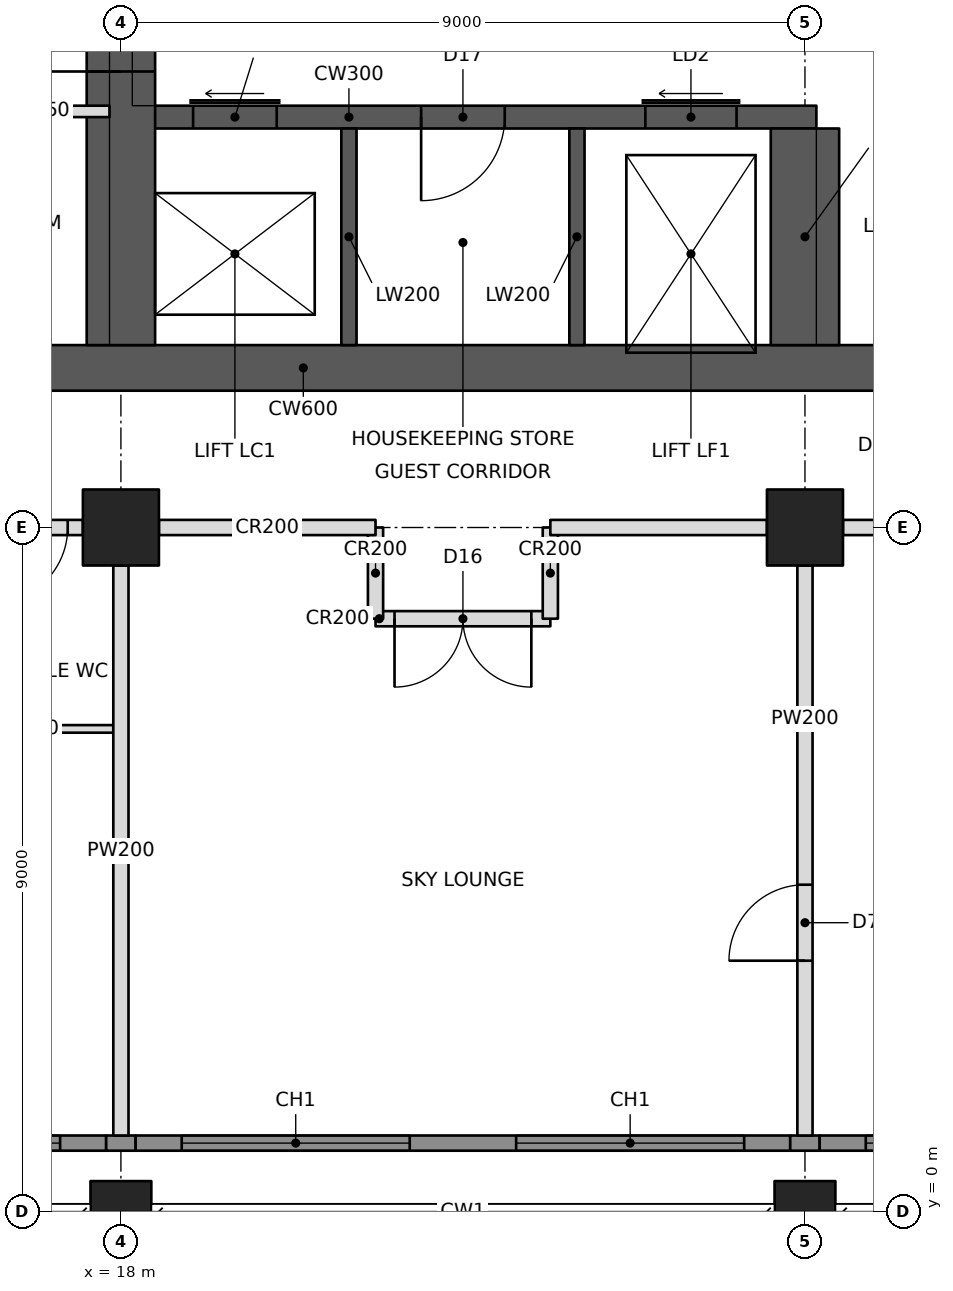
"""IFC4 building model, lengths in metres.
Left out: names, types, materials, properties, quantities, classifications, styles, units other than length and angle.
Written with IfcOpenShell. Run it as: python <this file> out.ifc"""

import sys

from ifc_helpers import new_model, si_unit, direction, frame, frame_2d, origin, origin_2d, place, context, subcontext, project, spatial, rectangle, hollow_rectangle, extrude, element, fill, save


model = new_model("IFC4")
c1 = context("Model", 3, precision=1e-05, world=origin(), true_north=direction((0.0, 1.0)))
c2 = subcontext(c1, "Body", "Model", "MODEL_VIEW")
j1 = project(units=[si_unit("LENGTHUNIT", "METRE"), si_unit("PLANEANGLEUNIT", "RADIAN")], contexts=[c1])
p1 = place(None, origin())
s1 = spatial("IfcSite", under=j1, at=p1, CompositionType="ELEMENT")
p2 = place(p1, origin())
s2 = spatial("IfcBuilding", under=s1, at=p2, CompositionType="ELEMENT")
p3 = place(p2, frame((0.0, 0.0, 160.4)))
s3 = spatial("IfcBuildingStorey", under=s2, at=p3, CompositionType="ELEMENT", Elevation=160.4)
p4 = place(p3, frame((18.0, 0.0, 0.0), z_axis=(0.0, 0.0, 1.0), x_axis=(1.0, 0.0, 0.0)))
e1 = element("IfcColumn", 1, at=p4, inside=s3, PredefinedType="COLUMN", context=c2, shape_type="SweptSolid", body=[
    extrude(hollow_rectangle(XDim=0.8, YDim=0.8, WallThickness=0.07, at=origin_2d()), origin(), (0.0, 0.0, 1.0), 3.4),
])
p5 = place(p3, frame((18.0, 9.0, 0.0), z_axis=(0.0, 0.0, 1.0), x_axis=(1.0, 0.0, 0.0)))
e2 = element("IfcColumn", 2, at=p5, inside=s3, PredefinedType="COLUMN", context=c2, shape_type="SweptSolid", body=[
    extrude(hollow_rectangle(XDim=1.0, YDim=1.0, WallThickness=0.1, at=origin_2d()), origin(), (0.0, 0.0, 1.0), 3.4),
])
p6 = place(p3, frame((27.0, 0.0, 0.0), z_axis=(0.0, 0.0, 1.0), x_axis=(1.0, 0.0, 0.0)))
e3 = element("IfcColumn", 3, at=p6, inside=s3, PredefinedType="COLUMN", context=c2, shape_type="SweptSolid", body=[
    extrude(hollow_rectangle(XDim=0.8, YDim=0.8, WallThickness=0.07, at=origin_2d()), origin(), (0.0, 0.0, 1.0), 3.4),
])
p7 = place(p3, frame((27.0, 9.0, 0.0), z_axis=(0.0, 0.0, 1.0), x_axis=(1.0, 0.0, 0.0)))
e4 = element("IfcColumn", 4, at=p7, inside=s3, PredefinedType="COLUMN", context=c2, shape_type="SweptSolid", body=[
    extrude(hollow_rectangle(XDim=1.0, YDim=1.0, WallThickness=0.1, at=origin_2d()), origin(), (0.0, 0.0, 1.0), 3.4),
])
p8 = place(p3, frame((10.8, 11.1, 0.0), z_axis=(0.0, 0.0, 1.0), x_axis=(1.0, 0.0, 0.0)))
e5 = element("IfcWall", 5, at=p8, inside=s3, PredefinedType="SHEAR", context=c2, shape_type="SweptSolid", body=[
    extrude(rectangle(XDim=23.4, YDim=0.6, at=frame_2d((11.7, 0.0))), origin(), (0.0, 0.0, 1.0), 3.4),
])
p9 = place(p8, frame((1.0, 0.0, 0.0)))
e6 = element("IfcOpeningElement", 6, at=p9, cuts=e5, PredefinedType="OPENING", context=c2, shape_type="SweptSolid", body=[
    extrude(rectangle(XDim=1.0, YDim=2.1, at=frame_2d((0.5, 1.05))), frame((0.0, 0.31, 0.0), z_axis=(0.0, -1.0, 0.0), x_axis=(1.0, 0.0, 0.0)), (0.0, 0.0, 1.0), 0.62),
])
p10 = place(p8, frame((17.2, 0.0, 0.0)))
e7 = element("IfcOpeningElement", 7, at=p10, cuts=e5, PredefinedType="OPENING", context=c2, shape_type="SweptSolid", body=[
    extrude(rectangle(XDim=1.8, YDim=2.1, at=frame_2d((0.9, 1.05))), frame((0.0, 0.31, 0.0), z_axis=(0.0, -1.0, 0.0), x_axis=(1.0, 0.0, 0.0)), (0.0, 0.0, 1.0), 0.62),
])
p11 = place(p3, frame((18.0, 11.4, 0.0), z_axis=(0.0, 0.0, 1.0), x_axis=(0.0, 1.0, 0.0)))
e8 = element("IfcWall", 8, at=p11, inside=s3, PredefinedType="SHEAR", context=c2, shape_type="SweptSolid", body=[
    extrude(rectangle(XDim=13.2, YDim=0.9, at=frame_2d((6.6, 0.0))), origin(), (0.0, 0.0, 1.0), 3.4),
])
p12 = place(p11, frame((3.6, 0.0, 0.0)))
e9 = element("IfcOpeningElement", 9, at=p12, cuts=e8, PredefinedType="OPENING", context=c2, shape_type="SweptSolid", body=[
    extrude(rectangle(XDim=1.0, YDim=2.1, at=frame_2d((0.5, 1.05))), frame((0.0, 0.46, 0.0), z_axis=(0.0, -1.0, 0.0), x_axis=(1.0, 0.0, 0.0)), (0.0, 0.0, 1.0), 0.92),
])
p13 = place(p11, frame((7.85, 0.0, 0.0)))
e10 = element("IfcOpeningElement", 10, at=p13, cuts=e8, PredefinedType="OPENING", context=c2, shape_type="SweptSolid", body=[
    extrude(rectangle(XDim=1.1, YDim=2.1, at=frame_2d((0.55, 1.05))), frame((0.0, 0.46, 0.0), z_axis=(0.0, -1.0, 0.0), x_axis=(1.0, 0.0, 0.0)), (0.0, 0.0, 1.0), 0.92),
])
p14 = place(p3, frame((18.15, 14.4, 0.0), z_axis=(0.0, 0.0, 1.0), x_axis=(1.0, 0.0, 0.0)))
e11 = element("IfcWall", 11, at=p14, inside=s3, PredefinedType="SHEAR", context=c2, shape_type="SweptSolid", body=[
    extrude(rectangle(XDim=9.0, YDim=0.3, at=frame_2d((4.5, 0.0))), origin(), (0.0, 0.0, 1.0), 3.4),
])
p15 = place(p14, frame((0.8, 0.0, 0.0)))
e12 = element("IfcOpeningElement", 12, at=p15, cuts=e11, PredefinedType="OPENING", context=c2, shape_type="SweptSolid", body=[
    extrude(rectangle(XDim=1.1, YDim=2.1, at=frame_2d((0.55, 1.05))), frame((0.0, 0.16, 0.0), z_axis=(0.0, -1.0, 0.0), x_axis=(1.0, 0.0, 0.0)), (0.0, 0.0, 1.0), 0.32),
])
p16 = place(p14, frame((6.75, 0.0, 0.0)))
e13 = element("IfcOpeningElement", 13, at=p16, cuts=e11, PredefinedType="OPENING", context=c2, shape_type="SweptSolid", body=[
    extrude(rectangle(XDim=1.2, YDim=2.1, at=frame_2d((0.6, 1.05))), frame((0.0, 0.16, 0.0), z_axis=(0.0, -1.0, 0.0), x_axis=(1.0, 0.0, 0.0)), (0.0, 0.0, 1.0), 0.32),
])
p17 = place(p14, frame((3.8, 0.0, 0.0)))
e14 = element("IfcOpeningElement", 14, at=p17, cuts=e11, PredefinedType="OPENING", context=c2, shape_type="SweptSolid", body=[
    extrude(rectangle(XDim=1.1, YDim=2.1, at=frame_2d((0.55, 1.05))), frame((0.0, 0.16, 0.0), z_axis=(0.0, -1.0, 0.0), x_axis=(1.0, 0.0, 0.0)), (0.0, 0.0, 1.0), 0.32),
])
p18 = place(p3, frame((27.0, 11.4, 0.0), z_axis=(0.0, 0.0, 1.0), x_axis=(0.0, 1.0, 0.0)))
e15 = element("IfcWall", 15, at=p18, inside=s3, PredefinedType="SHEAR", context=c2, shape_type="SweptSolid", body=[
    extrude(rectangle(XDim=2.85, YDim=0.9, at=frame_2d((1.425, 0.0))), origin(), (0.0, 0.0, 1.0), 3.4),
])
for number, where, z_axis, x_axis in (
    (16, (21.0, 11.4, 0.0), (0.0, 0.0, 1.0), (0.0, 1.0, 0.0)),
    (17, (24.0, 11.4, 0.0), (0.0, 0.0, 1.0), (0.0, 1.0, 0.0)),
):
    element("IfcWall", number, at=place(p3, frame(where, z_axis=z_axis, x_axis=x_axis)), inside=s3, PredefinedType="SHEAR", context=c2, shape_type="SweptSolid", body=[
        extrude(rectangle(XDim=2.85, YDim=0.2, at=frame_2d((1.425, 0.0))), origin(), (0.0, 0.0, 1.0), 3.4),
    ])
p19 = place(p3, frame((9.5, 9.0, 0.0), z_axis=(0.0, 0.0, 1.0), x_axis=(1.0, 0.0, 0.0)))
e18 = element("IfcWall", 18, at=p19, inside=s3, PredefinedType="PARTITIONING", context=c2, shape_type="SweptSolid", body=[
    extrude(rectangle(XDim=8.0, YDim=0.2, at=frame_2d((4.0, 0.0))), origin(), (0.0, 0.0, 1.0), 2.405),
])
p20 = place(p19, frame((2.75, 0.0, 0.0)))
e19 = element("IfcOpeningElement", 19, at=p20, cuts=e18, PredefinedType="OPENING", context=c2, shape_type="SweptSolid", body=[
    extrude(rectangle(XDim=1.0, YDim=2.1, at=frame_2d((0.5, 1.05))), frame((0.0, 0.11, 0.0), z_axis=(0.0, -1.0, 0.0), x_axis=(1.0, 0.0, 0.0)), (0.0, 0.0, 1.0), 0.22),
])
p21 = place(p19, frame((6.8, 0.0, 0.0)))
e20 = element("IfcOpeningElement", 20, at=p21, cuts=e18, PredefinedType="OPENING", context=c2, shape_type="SweptSolid", body=[
    extrude(rectangle(XDim=1.0, YDim=2.1, at=frame_2d((0.5, 1.05))), frame((0.0, 0.11, 0.0), z_axis=(0.0, -1.0, 0.0), x_axis=(1.0, 0.0, 0.0)), (0.0, 0.0, 1.0), 0.22),
])
p22 = place(p19, frame((4.25, 0.0, 0.0)))
e21 = element("IfcOpeningElement", 21, at=p22, cuts=e18, PredefinedType="OPENING", context=c2, shape_type="SweptSolid", body=[
    extrude(rectangle(XDim=1.0, YDim=2.1, at=frame_2d((0.5, 1.05))), frame((0.0, 0.11, 0.0), z_axis=(0.0, -1.0, 0.0), x_axis=(1.0, 0.0, 0.0)), (0.0, 0.0, 1.0), 0.22),
])
p23 = place(p3, frame((18.5, 9.0, 0.0), z_axis=(0.0, 0.0, 1.0), x_axis=(1.0, 0.0, 0.0)))
e22 = element("IfcWall", 22, at=p23, inside=s3, PredefinedType="PARTITIONING", context=c2, shape_type="SweptSolid", body=[
    extrude(rectangle(XDim=2.85, YDim=0.2, at=frame_2d((1.425, 0.0))), origin(), (0.0, 0.0, 1.0), 2.405),
])
p24 = place(p3, frame((27.5, 9.0, 0.0), z_axis=(0.0, 0.0, 1.0), x_axis=(1.0, 0.0, 0.0)))
e23 = element("IfcWall", 23, at=p24, inside=s3, PredefinedType="PARTITIONING", context=c2, shape_type="SweptSolid", body=[
    extrude(rectangle(XDim=8.0, YDim=0.2, at=frame_2d((4.0, 0.0))), origin(), (0.0, 0.0, 1.0), 2.405),
])
p25 = place(p24, frame((0.85, 0.0, 0.0)))
e24 = element("IfcOpeningElement", 24, at=p25, cuts=e23, PredefinedType="OPENING", context=c2, shape_type="SweptSolid", body=[
    extrude(rectangle(XDim=1.8, YDim=2.4, at=frame_2d((0.9, 1.2))), frame((0.0, 0.11, 0.0), z_axis=(0.0, -1.0, 0.0), x_axis=(1.0, 0.0, 0.0)), (0.0, 0.0, 1.0), 0.22),
])
p26 = place(p24, frame((5.35, 0.0, 0.0)))
e25 = element("IfcOpeningElement", 25, at=p26, cuts=e23, PredefinedType="OPENING", context=c2, shape_type="SweptSolid", body=[
    extrude(rectangle(XDim=1.8, YDim=2.4, at=frame_2d((0.9, 1.2))), frame((0.0, 0.11, 0.0), z_axis=(0.0, -1.0, 0.0), x_axis=(1.0, 0.0, 0.0)), (0.0, 0.0, 1.0), 0.22),
])
p27 = place(p3, frame((18.0, 8.5, 0.0), z_axis=(0.0, 0.0, 1.0), x_axis=(0.0, -1.0, 0.0)))
e26 = element("IfcWall", 26, at=p27, inside=s3, PredefinedType="PARTITIONING", context=c2, shape_type="SweptSolid", body=[
    extrude(rectangle(XDim=7.5, YDim=0.2, at=frame_2d((3.75, 0.0))), origin(), (0.0, 0.0, 1.0), 2.405),
])
p28 = place(p3, frame((27.0, 8.5, 0.0), z_axis=(0.0, 0.0, 1.0), x_axis=(0.0, -1.0, 0.0)))
e27 = element("IfcWall", 27, at=p28, inside=s3, PredefinedType="PARTITIONING", context=c2, shape_type="SweptSolid", body=[
    extrude(rectangle(XDim=7.5, YDim=0.2, at=frame_2d((3.75, 0.0))), origin(), (0.0, 0.0, 1.0), 2.405),
])
p29 = place(p28, frame((4.2, 0.0, 0.0)))
e28 = element("IfcOpeningElement", 28, at=p29, cuts=e27, PredefinedType="OPENING", context=c2, shape_type="SweptSolid", body=[
    extrude(rectangle(XDim=1.0, YDim=2.1, at=frame_2d((0.5, 1.05))), frame((0.0, 0.11, 0.0), z_axis=(0.0, -1.0, 0.0), x_axis=(1.0, 0.0, 0.0)), (0.0, 0.0, 1.0), 0.22),
])
p30 = place(p3, frame((15.65, 6.35, 0.0), z_axis=(0.0, 0.0, 1.0), x_axis=(1.0, 0.0, 0.0)))
e29 = element("IfcWall", 29, at=p30, inside=s3, PredefinedType="PARTITIONING", context=c2, shape_type="SweptSolid", body=[
    extrude(rectangle(XDim=2.25, YDim=0.1, at=frame_2d((1.125, 0.0))), origin(), (0.0, 0.0, 1.0), 2.404),
])
p31 = place(p3, frame((23.65, 9.0, 0.0), z_axis=(0.0, 0.0, 1.0), x_axis=(1.0, 0.0, 0.0)))
e30 = element("IfcWall", 30, at=p31, inside=s3, PredefinedType="PARTITIONING", context=c2, shape_type="SweptSolid", body=[
    extrude(rectangle(XDim=2.85, YDim=0.2, at=frame_2d((1.425, 0.0))), origin(), (0.0, 0.0, 1.0), 2.405),
])
for number, where, z_axis, x_axis in (
    (31, (21.35, 9.0, 0.0), (0.0, 0.0, 1.0), (0.0, -1.0, 0.0)),
    (32, (23.65, 9.0, 0.0), (0.0, 0.0, 1.0), (0.0, -1.0, 0.0)),
):
    element("IfcWall", number, at=place(p3, frame(where, z_axis=z_axis, x_axis=x_axis)), inside=s3, PredefinedType="PARTITIONING", context=c2, shape_type="SweptSolid", body=[
        extrude(rectangle(XDim=1.2, YDim=0.2, at=frame_2d((0.6, 0.0))), origin(), (0.0, 0.0, 1.0), 2.404),
    ])
p32 = place(p3, frame((21.35, 7.8, 0.0), z_axis=(0.0, 0.0, 1.0), x_axis=(1.0, 0.0, 0.0)))
e33 = element("IfcWall", 33, at=p32, inside=s3, PredefinedType="PARTITIONING", context=c2, shape_type="SweptSolid", body=[
    extrude(rectangle(XDim=2.3, YDim=0.2, at=frame_2d((1.15, 0.0))), origin(), (0.0, 0.0, 1.0), 3.2),
])
p33 = place(p32, frame((0.25, 0.0, 0.0)))
e34 = element("IfcOpeningElement", 34, at=p33, cuts=e33, PredefinedType="OPENING", context=c2, shape_type="SweptSolid", body=[
    extrude(rectangle(XDim=1.8, YDim=2.4, at=frame_2d((0.9, 1.2))), frame((0.0, 0.11, 0.0), z_axis=(0.0, -1.0, 0.0), x_axis=(1.0, 0.0, 0.0)), (0.0, 0.0, 1.0), 0.22),
])
p34 = place(p3, frame((14.55, 14.475, 0.0), z_axis=(0.0, 0.0, 1.0), x_axis=(1.0, 0.0, 0.0)))
e35 = element("IfcWall", 35, at=p34, inside=s3, PredefinedType="PARTITIONING", context=c2, shape_type="SweptSolid", body=[
    extrude(rectangle(XDim=3.3, YDim=0.15, at=frame_2d((1.65, 0.0))), origin(), (0.0, 0.0, 1.0), 3.2),
])
p35 = place(p34, frame((0.3, 0.0, 0.0)))
e36 = element("IfcOpeningElement", 36, at=p35, cuts=e35, PredefinedType="OPENING", context=c2, shape_type="SweptSolid", body=[
    extrude(rectangle(XDim=1.0, YDim=2.1, at=frame_2d((0.5, 1.05))), frame((0.0, 0.085, 0.0), z_axis=(0.0, -1.0, 0.0), x_axis=(1.0, 0.0, 0.0)), (0.0, 0.0, 1.0), 0.17),
])
p36 = place(p3, frame((9.135, 0.9, 0.0), z_axis=(0.0, 0.0, 1.0), x_axis=(1.0, 0.0, 0.0)))
e37 = element("IfcWall", 37, at=p36, inside=s3, PredefinedType="SOLIDWALL", context=c2, shape_type="SweptSolid", body=[
    extrude(rectangle(XDim=8.671, YDim=0.2, at=frame_2d((4.335, 0.0))), origin(), (0.0, 0.0, 1.0), 3.2),
])
p37 = place(p36, frame((0.665, 0.0, 0.6)))
e38 = element("IfcOpeningElement", 38, at=p37, cuts=e37, PredefinedType="OPENING", context=c2, shape_type="SweptSolid", body=[
    extrude(rectangle(XDim=3.0, YDim=2.2, at=frame_2d((1.5, 1.1))), frame((0.0, 0.11, 0.0), z_axis=(0.0, -1.0, 0.0), x_axis=(1.0, 0.0, 0.0)), (0.0, 0.0, 1.0), 0.22),
])
p38 = place(p36, frame((5.065, 0.0, 0.6)))
e39 = element("IfcOpeningElement", 39, at=p38, cuts=e37, PredefinedType="OPENING", context=c2, shape_type="SweptSolid", body=[
    extrude(rectangle(XDim=3.0, YDim=2.2, at=frame_2d((1.5, 1.1))), frame((0.0, 0.11, 0.0), z_axis=(0.0, -1.0, 0.0), x_axis=(1.0, 0.0, 0.0)), (0.0, 0.0, 1.0), 0.22),
])
p39 = place(p3, frame((17.806, 0.9, 0.0), z_axis=(0.0, 0.0, 1.0), x_axis=(1.0, 0.0, 0.0)))
e40 = element("IfcWall", 40, at=p39, inside=s3, PredefinedType="SOLIDWALL", context=c2, shape_type="SweptSolid", body=[
    extrude(rectangle(XDim=0.388, YDim=0.2, at=frame_2d((0.194, 0.0))), origin(), (0.0, 0.0, 1.0), 2.404),
])
p40 = place(p3, frame((18.194, 0.9, 0.0), z_axis=(0.0, 0.0, 1.0), x_axis=(1.0, 0.0, 0.0)))
e41 = element("IfcWall", 41, at=p40, inside=s3, PredefinedType="SOLIDWALL", context=c2, shape_type="SweptSolid", body=[
    extrude(rectangle(XDim=8.612, YDim=0.2, at=frame_2d((4.306, 0.0))), origin(), (0.0, 0.0, 1.0), 3.2),
])
p41 = place(p40, frame((0.606, 0.0, 0.6)))
e42 = element("IfcOpeningElement", 42, at=p41, cuts=e41, PredefinedType="OPENING", context=c2, shape_type="SweptSolid", body=[
    extrude(rectangle(XDim=3.0, YDim=2.2, at=frame_2d((1.5, 1.1))), frame((0.0, 0.11, 0.0), z_axis=(0.0, -1.0, 0.0), x_axis=(1.0, 0.0, 0.0)), (0.0, 0.0, 1.0), 0.22),
])
p42 = place(p40, frame((5.006, 0.0, 0.6)))
e43 = element("IfcOpeningElement", 43, at=p42, cuts=e41, PredefinedType="OPENING", context=c2, shape_type="SweptSolid", body=[
    extrude(rectangle(XDim=3.0, YDim=2.2, at=frame_2d((1.5, 1.1))), frame((0.0, 0.11, 0.0), z_axis=(0.0, -1.0, 0.0), x_axis=(1.0, 0.0, 0.0)), (0.0, 0.0, 1.0), 0.22),
])
p43 = place(p3, frame((26.806, 0.9, 0.0), z_axis=(0.0, 0.0, 1.0), x_axis=(1.0, 0.0, 0.0)))
e44 = element("IfcWall", 44, at=p43, inside=s3, PredefinedType="SOLIDWALL", context=c2, shape_type="SweptSolid", body=[
    extrude(rectangle(XDim=0.388, YDim=0.2, at=frame_2d((0.194, 0.0))), origin(), (0.0, 0.0, 1.0), 2.404),
])
p44 = place(p3, frame((27.194, 0.9, 0.0), z_axis=(0.0, 0.0, 1.0), x_axis=(1.0, 0.0, 0.0)))
e45 = element("IfcWall", 45, at=p44, inside=s3, PredefinedType="SOLIDWALL", context=c2, shape_type="SweptSolid", body=[
    extrude(rectangle(XDim=8.671, YDim=0.2, at=frame_2d((4.335, 0.0))), origin(), (0.0, 0.0, 1.0), 3.2),
])
p45 = place(p44, frame((0.606, 0.0, 0.6)))
e46 = element("IfcOpeningElement", 46, at=p45, cuts=e45, PredefinedType="OPENING", context=c2, shape_type="SweptSolid", body=[
    extrude(rectangle(XDim=3.0, YDim=2.2, at=frame_2d((1.5, 1.1))), frame((0.0, 0.11, 0.0), z_axis=(0.0, -1.0, 0.0), x_axis=(1.0, 0.0, 0.0)), (0.0, 0.0, 1.0), 0.22),
])
p46 = place(p44, frame((5.006, 0.0, 0.6)))
e47 = element("IfcOpeningElement", 47, at=p46, cuts=e45, PredefinedType="OPENING", context=c2, shape_type="SweptSolid", body=[
    extrude(rectangle(XDim=3.0, YDim=2.2, at=frame_2d((1.5, 1.1))), frame((0.0, 0.11, 0.0), z_axis=(0.0, -1.0, 0.0), x_axis=(1.0, 0.0, 0.0)), (0.0, 0.0, 1.0), 0.22),
])
p47 = place(p38, origin())
e48 = element("IfcWindow", 48, at=p47, inside=s3, PartitioningType="TRIPLE_PANEL_VERTICAL", PredefinedType="WINDOW", context=c2, shape_type="SweptSolid", body=[
    extrude(rectangle(XDim=3.0, YDim=2.2, at=frame_2d((1.5, 1.1))), frame((0.0, 0.03, 0.0), z_axis=(0.0, -1.0, 0.0), x_axis=(1.0, 0.0, 0.0)), (0.0, 0.0, 1.0), 0.06),
])
fill(e39, e48)
p48 = place(p41, origin())
e49 = element("IfcWindow", 49, at=p48, inside=s3, PartitioningType="TRIPLE_PANEL_VERTICAL", PredefinedType="WINDOW", context=c2, shape_type="SweptSolid", body=[
    extrude(rectangle(XDim=3.0, YDim=2.2, at=frame_2d((1.5, 1.1))), frame((0.0, 0.03, 0.0), z_axis=(0.0, -1.0, 0.0), x_axis=(1.0, 0.0, 0.0)), (0.0, 0.0, 1.0), 0.06),
])
fill(e42, e49)
p49 = place(p42, origin())
e50 = element("IfcWindow", 50, at=p49, inside=s3, PartitioningType="TRIPLE_PANEL_VERTICAL", PredefinedType="WINDOW", context=c2, shape_type="SweptSolid", body=[
    extrude(rectangle(XDim=3.0, YDim=2.2, at=frame_2d((1.5, 1.1))), frame((0.0, 0.03, 0.0), z_axis=(0.0, -1.0, 0.0), x_axis=(1.0, 0.0, 0.0)), (0.0, 0.0, 1.0), 0.06),
])
fill(e43, e50)
p50 = place(p45, origin())
e51 = element("IfcWindow", 51, at=p50, inside=s3, PartitioningType="TRIPLE_PANEL_VERTICAL", PredefinedType="WINDOW", context=c2, shape_type="SweptSolid", body=[
    extrude(rectangle(XDim=3.0, YDim=2.2, at=frame_2d((1.5, 1.1))), frame((0.0, 0.03, 0.0), z_axis=(0.0, -1.0, 0.0), x_axis=(1.0, 0.0, 0.0)), (0.0, 0.0, 1.0), 0.06),
])
fill(e46, e51)
p51 = place(p29, frame((1.0, 0.0, 0.0), z_axis=(0.0, 0.0, 1.0), x_axis=(-1.0, 0.0, 0.0)))
e52 = element("IfcDoor", 52, at=p51, inside=s3, OperationType="SINGLE_SWING_LEFT", PredefinedType="DOOR", context=c2, shape_type="SweptSolid", body=[
    extrude(rectangle(XDim=1.0, YDim=2.1, at=frame_2d((0.5, 1.05))), frame((0.0, 0.025, 0.0), z_axis=(0.0, -1.0, 0.0), x_axis=(1.0, 0.0, 0.0)), (0.0, 0.0, 1.0), 0.05),
])
fill(e28, e52)
p52 = place(p21, frame((1.0, 0.0, 0.0), z_axis=(0.0, 0.0, 1.0), x_axis=(-1.0, 0.0, 0.0)))
e53 = element("IfcDoor", 53, at=p52, inside=s3, OperationType="SINGLE_SWING_RIGHT", PredefinedType="DOOR", context=c2, shape_type="SweptSolid", body=[
    extrude(rectangle(XDim=1.0, YDim=2.1, at=frame_2d((0.5, 1.05))), frame((0.0, 0.025, 0.0), z_axis=(0.0, -1.0, 0.0), x_axis=(1.0, 0.0, 0.0)), (0.0, 0.0, 1.0), 0.05),
])
fill(e20, e53)
p53 = place(p33, frame((1.8, 0.0, 0.0), z_axis=(0.0, 0.0, 1.0), x_axis=(-1.0, 0.0, 0.0)))
e54 = element("IfcDoor", 54, at=p53, inside=s3, OperationType="DOUBLE_DOOR_SINGLE_SWING", PredefinedType="DOOR", context=c2, shape_type="SweptSolid", body=[
    extrude(rectangle(XDim=1.8, YDim=2.4, at=frame_2d((0.9, 1.2))), frame((0.0, 0.025, 0.0), z_axis=(0.0, -1.0, 0.0), x_axis=(1.0, 0.0, 0.0)), (0.0, 0.0, 1.0), 0.05),
])
fill(e34, e54)
p54 = place(p12, origin())
e55 = element("IfcDoor", 55, at=p54, inside=s3, OperationType="SINGLE_SWING_LEFT", PredefinedType="DOOR", context=c2, shape_type="SweptSolid", body=[
    extrude(rectangle(XDim=1.0, YDim=2.1, at=frame_2d((0.5, 1.05))), frame((0.0, 0.025, 0.0), z_axis=(0.0, -1.0, 0.0), x_axis=(1.0, 0.0, 0.0)), (0.0, 0.0, 1.0), 0.05),
])
fill(e9, e55)
p55 = place(p15, origin())
e56 = element("IfcDoor", 56, at=p55, inside=s3, OperationType="SLIDING_TO_LEFT", PredefinedType="DOOR", context=c2, shape_type="SweptSolid", body=[
    extrude(rectangle(XDim=1.1, YDim=2.1, at=frame_2d((0.55, 1.05))), frame((0.0, 0.025, 0.0), z_axis=(0.0, -1.0, 0.0), x_axis=(1.0, 0.0, 0.0)), (0.0, 0.0, 1.0), 0.05),
])
fill(e12, e56)
p56 = place(p16, origin())
e57 = element("IfcDoor", 57, at=p56, inside=s3, OperationType="SLIDING_TO_LEFT", PredefinedType="DOOR", context=c2, shape_type="SweptSolid", body=[
    extrude(rectangle(XDim=1.2, YDim=2.1, at=frame_2d((0.6, 1.05))), frame((0.0, 0.025, 0.0), z_axis=(0.0, -1.0, 0.0), x_axis=(1.0, 0.0, 0.0)), (0.0, 0.0, 1.0), 0.05),
])
fill(e13, e57)
p57 = place(p17, frame((1.1, 0.0, 0.0), z_axis=(0.0, 0.0, 1.0), x_axis=(-1.0, 0.0, 0.0)))
e58 = element("IfcDoor", 58, at=p57, inside=s3, OperationType="SINGLE_SWING_RIGHT", PredefinedType="DOOR", context=c2, shape_type="SweptSolid", body=[
    extrude(rectangle(XDim=1.1, YDim=2.1, at=frame_2d((0.55, 1.05))), frame((0.0, 0.025, 0.0), z_axis=(0.0, -1.0, 0.0), x_axis=(1.0, 0.0, 0.0)), (0.0, 0.0, 1.0), 0.05),
])
fill(e14, e58)
save(model, sys.argv[1])
